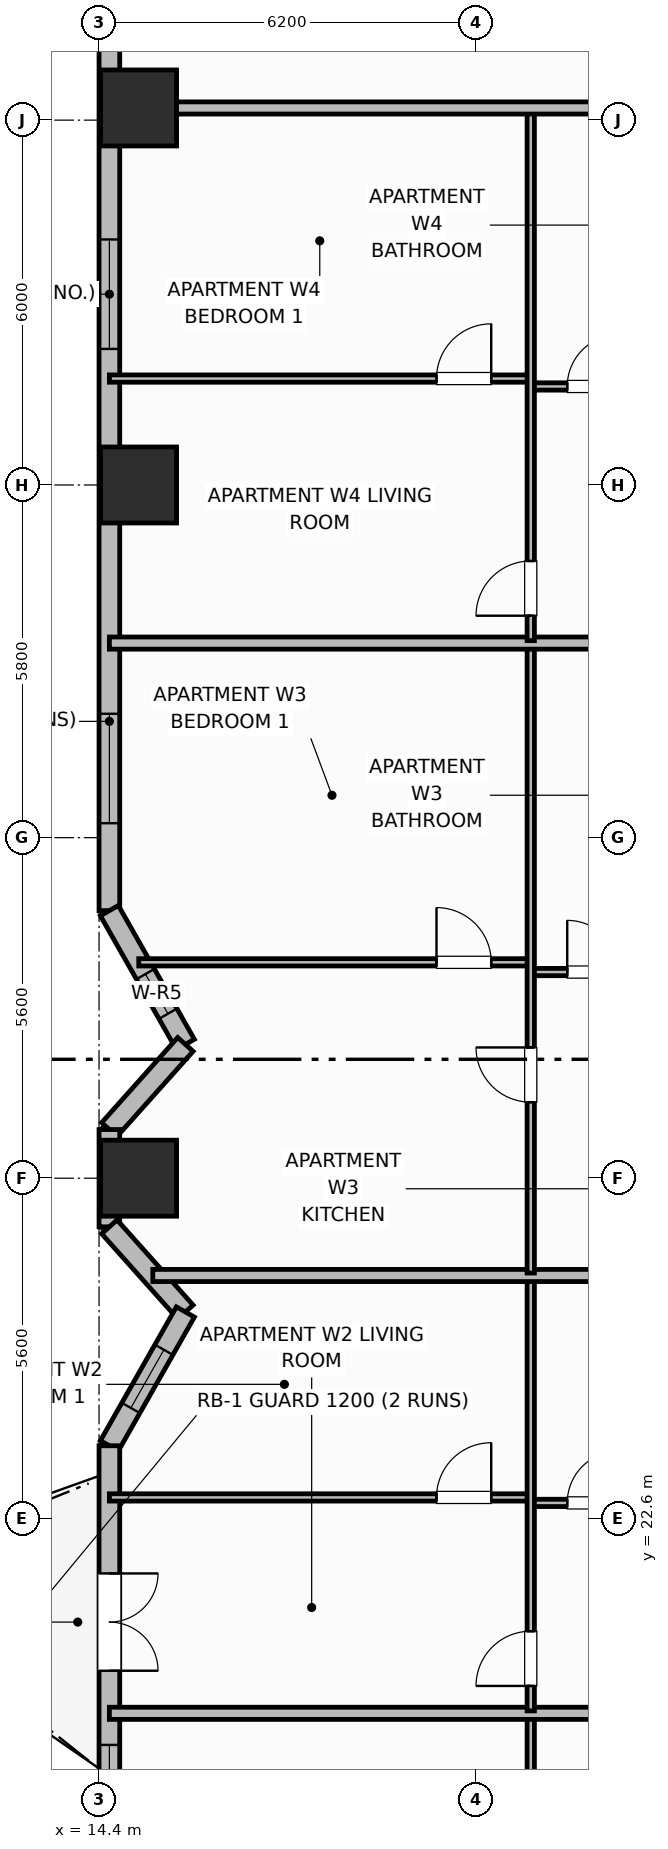
"""IFC4 building model, lengths in metres.
Left out: names, types, materials, properties, quantities, classifications, styles, units other than length and angle.
Written with IfcOpenShell. Run it as: python <this file> out.ifc"""

import sys

from ifc_helpers import new_model, si_unit, direction, frame, frame_2d, origin, origin_2d, place, context, subcontext, project, spatial, rectangle, extrude, element, fill, save


model = new_model("IFC4")
c1 = context("Model", 3, precision=1e-05, world=origin(), true_north=direction((0.0, 1.0)))
c2 = subcontext(c1, "Body", "Model", "MODEL_VIEW")
j1 = project(units=[si_unit("LENGTHUNIT", "METRE"), si_unit("PLANEANGLEUNIT", "RADIAN")], contexts=[c1])
p1 = place(None, origin())
s1 = spatial("IfcSite", under=j1, at=p1, CompositionType="ELEMENT")
p2 = place(p1, origin())
s2 = spatial("IfcBuilding", under=s1, at=p2, CompositionType="ELEMENT")
p3 = place(p2, frame((0.0, 0.0, 47.3)))
s3 = spatial("IfcBuildingStorey", under=s2, at=p3, CompositionType="ELEMENT", Elevation=47.3)
for number, where, z_axis, x_axis in (
    (1, (15.05, 28.2, 0.0), (0.0, 0.0, 1.0), (1.0, 0.0, 0.0)),
    (2, (15.05, 39.6, 0.0), (0.0, 0.0, 1.0), (1.0, 0.0, 0.0)),
    (3, (15.05, 45.8, 0.0), (0.0, 0.0, 1.0), (1.0, 0.0, 0.0)),
):
    element("IfcColumn", number, at=place(p3, frame(where, z_axis=z_axis, x_axis=x_axis)), inside=s3, PredefinedType="COLUMN", context=c2, shape_type="SweptSolid", body=[
        extrude(rectangle(XDim=1.25, YDim=1.25, at=origin_2d()), origin(), (0.0, 0.0, 1.0), 3.7),
    ])
p4 = place(p3, frame((14.57, 47.4, 0.0), z_axis=(0.0, 0.0, 1.0), x_axis=(0.0, -1.0, 0.0)))
e4 = element("IfcWall", 4, at=p4, inside=s3, PredefinedType="SOLIDWALL", context=c2, shape_type="SweptSolid", body=[
    extrude(rectangle(XDim=14.8, YDim=0.34, at=frame_2d((7.4, 0.0))), origin(), (0.0, 0.0, 1.0), 2.7),
])
p5 = place(p4, frame((3.762, 0.0, 0.73)))
e5 = element("IfcOpeningElement", 5, at=p5, cuts=e4, PredefinedType="OPENING", context=c2, shape_type="SweptSolid", body=[
    extrude(rectangle(XDim=1.8, YDim=1.85, at=frame_2d((0.9, 0.925))), frame((0.0, 0.18, 0.0), z_axis=(0.0, -1.0, 0.0), x_axis=(1.0, 0.0, 0.0)), (0.0, 0.0, 1.0), 0.36),
])
p6 = place(p4, frame((11.562, 0.0, 0.73)))
e6 = element("IfcOpeningElement", 6, at=p6, cuts=e4, PredefinedType="OPENING", context=c2, shape_type="SweptSolid", body=[
    extrude(rectangle(XDim=1.8, YDim=1.85, at=frame_2d((0.9, 0.925))), frame((0.0, 0.18, 0.0), z_axis=(0.0, -1.0, 0.0), x_axis=(1.0, 0.0, 0.0)), (0.0, 0.0, 1.0), 0.36),
])
p7 = place(p3, frame((14.57, 32.6, 0.0), z_axis=(0.0, 0.0, 1.0), x_axis=(0.493976255291, -0.869475393101, 0.0)))
e7 = element("IfcWall", 7, at=p7, inside=s3, PredefinedType="SOLIDWALL", context=c2, shape_type="SweptSolid", body=[
    extrude(rectangle(XDim=2.531, YDim=0.34, at=frame_2d((1.265, 0.0))), origin(), (0.0, 0.0, 1.0), 2.7),
])
p8 = place(p7, frame((1.2, 0.0, 0.89)))
e8 = element("IfcOpeningElement", 8, at=p8, cuts=e7, PredefinedType="OPENING", context=c2, shape_type="SweptSolid", body=[
    extrude(rectangle(XDim=0.75, YDim=1.65, at=frame_2d((0.375, 0.825))), frame((0.0, 0.18, 0.0), z_axis=(0.0, -1.0, 0.0), x_axis=(1.0, 0.0, 0.0)), (0.0, 0.0, 1.0), 0.36),
])
p9 = place(p3, frame((15.82, 30.4, 0.0), z_axis=(0.0, 0.0, 1.0), x_axis=(-0.666041619974, -0.74591457987, 0.0)))
e9 = element("IfcWall", 9, at=p9, inside=s3, PredefinedType="SOLIDWALL", context=c2, shape_type="SweptSolid", body=[
    extrude(rectangle(XDim=1.877, YDim=0.34, at=frame_2d((0.938, 0.0))), origin(), (0.0, 0.0, 1.0), 2.7),
])
p10 = place(p3, frame((14.57, 29.0, 0.0), z_axis=(0.0, 0.0, 1.0), x_axis=(0.0, -1.0, 0.0)))
e10 = element("IfcWall", 10, at=p10, inside=s3, PredefinedType="SOLIDWALL", context=c2, shape_type="SweptSolid", body=[
    extrude(rectangle(XDim=1.6, YDim=0.34, at=frame_2d((0.8, 0.0))), origin(), (0.0, 0.0, 1.0), 2.7),
])
p11 = place(p3, frame((14.57, 27.4, 0.0), z_axis=(0.0, 0.0, 1.0), x_axis=(0.666041619974, -0.74591457987, 0.0)))
e11 = element("IfcWall", 11, at=p11, inside=s3, PredefinedType="SOLIDWALL", context=c2, shape_type="SweptSolid", body=[
    extrude(rectangle(XDim=1.877, YDim=0.34, at=frame_2d((0.938, 0.0))), origin(), (0.0, 0.0, 1.0), 2.7),
])
p12 = place(p3, frame((15.82, 26.0, 0.0), z_axis=(0.0, 0.0, 1.0), x_axis=(-0.494017696272, -0.869451847873, 0.0)))
e12 = element("IfcWall", 12, at=p12, inside=s3, PredefinedType="SOLIDWALL", context=c2, shape_type="SweptSolid", body=[
    extrude(rectangle(XDim=2.53, YDim=0.34, at=frame_2d((1.265, 0.0))), origin(), (0.0, 0.0, 1.0), 2.7),
])
p13 = place(p12, frame((0.715, 0.0, 0.89)))
e13 = element("IfcOpeningElement", 13, at=p13, cuts=e12, PredefinedType="OPENING", context=c2, shape_type="SweptSolid", body=[
    extrude(rectangle(XDim=1.1, YDim=1.65, at=frame_2d((0.55, 0.825))), frame((0.0, 0.18, 0.0), z_axis=(0.0, -1.0, 0.0), x_axis=(1.0, 0.0, 0.0)), (0.0, 0.0, 1.0), 0.36),
])
p14 = place(p3, frame((14.57, 23.8, 0.0), z_axis=(0.0, 0.0, 1.0), x_axis=(0.0, -1.0, 0.0)))
e14 = element("IfcWall", 14, at=p14, inside=s3, PredefinedType="SOLIDWALL", context=c2, shape_type="SweptSolid", body=[
    extrude(rectangle(XDim=14.8, YDim=0.34, at=frame_2d((7.4, 0.0))), origin(), (0.0, 0.0, 1.0), 2.7),
])
p15 = place(p14, frame((2.1, 0.0, 0.0)))
e15 = element("IfcOpeningElement", 15, at=p15, cuts=e14, PredefinedType="OPENING", context=c2, shape_type="SweptSolid", body=[
    extrude(rectangle(XDim=1.6, YDim=2.1, at=frame_2d((0.8, 1.05))), frame((0.0, 0.18, 0.0), z_axis=(0.0, -1.0, 0.0), x_axis=(1.0, 0.0, 0.0)), (0.0, 0.0, 1.0), 0.36),
])
p16 = place(p14, frame((4.92, 0.0, 0.69)))
e16 = element("IfcOpeningElement", 16, at=p16, cuts=e14, PredefinedType="OPENING", context=c2, shape_type="SweptSolid", body=[
    extrude(rectangle(XDim=1.4, YDim=1.85, at=frame_2d((0.7, 0.925))), frame((0.0, 0.18, 0.0), z_axis=(0.0, -1.0, 0.0), x_axis=(1.0, 0.0, 0.0)), (0.0, 0.0, 1.0), 0.36),
])
p17 = place(p14, frame((9.337, 0.0, 0.68)))
e17 = element("IfcOpeningElement", 17, at=p17, cuts=e14, PredefinedType="OPENING", context=c2, shape_type="SweptSolid", body=[
    extrude(rectangle(XDim=1.6, YDim=1.9, at=frame_2d((0.8, 0.95))), frame((0.0, 0.18, 0.0), z_axis=(0.0, -1.0, 0.0), x_axis=(1.0, 0.0, 0.0)), (0.0, 0.0, 1.0), 0.36),
])
p18 = place(p3, frame((21.5, 10.64, 0.0), z_axis=(0.0, 0.0, 1.0), x_axis=(0.0, 1.0, 0.0)))
e18 = element("IfcWall", 18, at=p18, inside=s3, PredefinedType="PARTITIONING", context=c2, shape_type="SweptSolid", body=[
    extrude(rectangle(XDim=8.72, YDim=0.12, at=frame_2d((4.36, 0.0))), origin(), (0.0, 0.0, 1.0), 2.53),
])
p19 = place(p18, frame((0.41, 0.0, 0.0)))
e19 = element("IfcOpeningElement", 19, at=p19, cuts=e18, PredefinedType="OPENING", context=c2, shape_type="SweptSolid", body=[
    extrude(rectangle(XDim=0.9, YDim=2.1, at=frame_2d((0.45, 1.05))), frame((0.0, 0.07, 0.0), z_axis=(0.0, -1.0, 0.0), x_axis=(1.0, 0.0, 0.0)), (0.0, 0.0, 1.0), 0.14),
])
p20 = place(p3, frame((14.57, 19.4, 0.0), z_axis=(0.0, 0.0, 1.0), x_axis=(1.0, 0.0, 0.0)))
e20 = element("IfcWall", 20, at=p20, inside=s3, PredefinedType="PARTITIONING", context=c2, shape_type="SweptSolid", body=[
    extrude(rectangle(XDim=9.18, YDim=0.2, at=frame_2d((4.59, 0.0))), origin(), (0.0, 0.0, 1.0), 2.53),
])
p21 = place(p3, frame((21.5, 22.86, 0.0), z_axis=(0.0, 0.0, 1.0), x_axis=(1.0, 0.0, 0.0)))
e21 = element("IfcWall", 21, at=p21, inside=s3, PredefinedType="PARTITIONING", context=c2, shape_type="SweptSolid", body=[
    extrude(rectangle(XDim=2.25, YDim=0.12, at=frame_2d((1.125, 0.0))), origin(), (0.0, 0.0, 1.0), 2.53),
])
p22 = place(p21, frame((0.6, 0.0, 0.0)))
e22 = element("IfcOpeningElement", 22, at=p22, cuts=e21, PredefinedType="OPENING", context=c2, shape_type="SweptSolid", body=[
    extrude(rectangle(XDim=0.85, YDim=2.1, at=frame_2d((0.425, 1.05))), frame((0.0, 0.07, 0.0), z_axis=(0.0, -1.0, 0.0), x_axis=(1.0, 0.0, 0.0)), (0.0, 0.0, 1.0), 0.14),
])
p23 = place(p3, frame((14.57, 22.95, 0.0), z_axis=(0.0, 0.0, 1.0), x_axis=(1.0, 0.0, 0.0)))
e23 = element("IfcWall", 23, at=p23, inside=s3, PredefinedType="PARTITIONING", context=c2, shape_type="SweptSolid", body=[
    extrude(rectangle(XDim=6.93, YDim=0.12, at=frame_2d((3.465, 0.0))), origin(), (0.0, 0.0, 1.0), 2.53),
])
p24 = place(p23, frame((5.38, 0.0, 0.0)))
e24 = element("IfcOpeningElement", 24, at=p24, cuts=e23, PredefinedType="OPENING", context=c2, shape_type="SweptSolid", body=[
    extrude(rectangle(XDim=0.9, YDim=2.1, at=frame_2d((0.45, 1.05))), frame((0.0, 0.07, 0.0), z_axis=(0.0, -1.0, 0.0), x_axis=(1.0, 0.0, 0.0)), (0.0, 0.0, 1.0), 0.14),
])
p25 = place(p3, frame((21.5, 19.44, 0.0), z_axis=(0.0, 0.0, 1.0), x_axis=(0.0, 1.0, 0.0)))
e25 = element("IfcWall", 25, at=p25, inside=s3, PredefinedType="PARTITIONING", context=c2, shape_type="SweptSolid", body=[
    extrude(rectangle(XDim=7.12, YDim=0.12, at=frame_2d((3.56, 0.0))), origin(), (0.0, 0.0, 1.0), 2.53),
])
p26 = place(p25, frame((0.41, 0.0, 0.0)))
e26 = element("IfcOpeningElement", 26, at=p26, cuts=e25, PredefinedType="OPENING", context=c2, shape_type="SweptSolid", body=[
    extrude(rectangle(XDim=0.9, YDim=2.1, at=frame_2d((0.45, 1.05))), frame((0.0, 0.07, 0.0), z_axis=(0.0, -1.0, 0.0), x_axis=(1.0, 0.0, 0.0)), (0.0, 0.0, 1.0), 0.14),
])
p27 = place(p3, frame((15.284, 26.6, 0.0), z_axis=(0.0, 0.0, 1.0), x_axis=(1.0, 0.0, 0.0)))
e27 = element("IfcWall", 27, at=p27, inside=s3, PredefinedType="PARTITIONING", context=c2, shape_type="SweptSolid", body=[
    extrude(rectangle(XDim=8.466, YDim=0.2, at=frame_2d((4.233, 0.0))), origin(), (0.0, 0.0, 1.0), 2.53),
])
p28 = place(p3, frame((21.5, 31.59, 0.0), z_axis=(0.0, 0.0, 1.0), x_axis=(1.0, 0.0, 0.0)))
e28 = element("IfcWall", 28, at=p28, inside=s3, PredefinedType="PARTITIONING", context=c2, shape_type="SweptSolid", body=[
    extrude(rectangle(XDim=2.25, YDim=0.12, at=frame_2d((1.125, 0.0))), origin(), (0.0, 0.0, 1.0), 2.53),
])
p29 = place(p28, frame((0.6, 0.0, 0.0)))
e29 = element("IfcOpeningElement", 29, at=p29, cuts=e28, PredefinedType="OPENING", context=c2, shape_type="SweptSolid", body=[
    extrude(rectangle(XDim=0.85, YDim=2.1, at=frame_2d((0.425, 1.05))), frame((0.0, 0.07, 0.0), z_axis=(0.0, -1.0, 0.0), x_axis=(1.0, 0.0, 0.0)), (0.0, 0.0, 1.0), 0.14),
])
p30 = place(p3, frame((15.053, 31.75, 0.0), z_axis=(0.0, 0.0, 1.0), x_axis=(1.0, 0.0, 0.0)))
e30 = element("IfcWall", 30, at=p30, inside=s3, PredefinedType="PARTITIONING", context=c2, shape_type="SweptSolid", body=[
    extrude(rectangle(XDim=6.447, YDim=0.12, at=frame_2d((3.224, 0.0))), origin(), (0.0, 0.0, 1.0), 2.53),
])
p31 = place(p30, frame((4.897, 0.0, 0.0)))
e31 = element("IfcOpeningElement", 31, at=p31, cuts=e30, PredefinedType="OPENING", context=c2, shape_type="SweptSolid", body=[
    extrude(rectangle(XDim=0.9, YDim=2.1, at=frame_2d((0.45, 1.05))), frame((0.0, 0.07, 0.0), z_axis=(0.0, -1.0, 0.0), x_axis=(1.0, 0.0, 0.0)), (0.0, 0.0, 1.0), 0.14),
])
p32 = place(p3, frame((21.5, 26.64, 0.0), z_axis=(0.0, 0.0, 1.0), x_axis=(0.0, 1.0, 0.0)))
e32 = element("IfcWall", 32, at=p32, inside=s3, PredefinedType="PARTITIONING", context=c2, shape_type="SweptSolid", body=[
    extrude(rectangle(XDim=10.32, YDim=0.12, at=frame_2d((5.16, 0.0))), origin(), (0.0, 0.0, 1.0), 2.53),
])
p33 = place(p32, frame((2.81, 0.0, 0.0)))
e33 = element("IfcOpeningElement", 33, at=p33, cuts=e32, PredefinedType="OPENING", context=c2, shape_type="SweptSolid", body=[
    extrude(rectangle(XDim=0.9, YDim=2.1, at=frame_2d((0.45, 1.05))), frame((0.0, 0.07, 0.0), z_axis=(0.0, -1.0, 0.0), x_axis=(1.0, 0.0, 0.0)), (0.0, 0.0, 1.0), 0.14),
])
p34 = place(p3, frame((14.57, 37.0, 0.0), z_axis=(0.0, 0.0, 1.0), x_axis=(1.0, 0.0, 0.0)))
e34 = element("IfcWall", 34, at=p34, inside=s3, PredefinedType="PARTITIONING", context=c2, shape_type="SweptSolid", body=[
    extrude(rectangle(XDim=9.18, YDim=0.2, at=frame_2d((4.59, 0.0))), origin(), (0.0, 0.0, 1.0), 2.53),
])
p35 = place(p3, frame((21.5, 41.22, 0.0), z_axis=(0.0, 0.0, 1.0), x_axis=(1.0, 0.0, 0.0)))
e35 = element("IfcWall", 35, at=p35, inside=s3, PredefinedType="PARTITIONING", context=c2, shape_type="SweptSolid", body=[
    extrude(rectangle(XDim=2.25, YDim=0.12, at=frame_2d((1.125, 0.0))), origin(), (0.0, 0.0, 1.0), 2.53),
])
p36 = place(p35, frame((0.6, 0.0, 0.0)))
e36 = element("IfcOpeningElement", 36, at=p36, cuts=e35, PredefinedType="OPENING", context=c2, shape_type="SweptSolid", body=[
    extrude(rectangle(XDim=0.85, YDim=2.1, at=frame_2d((0.425, 1.05))), frame((0.0, 0.07, 0.0), z_axis=(0.0, -1.0, 0.0), x_axis=(1.0, 0.0, 0.0)), (0.0, 0.0, 1.0), 0.14),
])
p37 = place(p3, frame((14.57, 41.35, 0.0), z_axis=(0.0, 0.0, 1.0), x_axis=(1.0, 0.0, 0.0)))
e37 = element("IfcWall", 37, at=p37, inside=s3, PredefinedType="PARTITIONING", context=c2, shape_type="SweptSolid", body=[
    extrude(rectangle(XDim=6.93, YDim=0.12, at=frame_2d((3.465, 0.0))), origin(), (0.0, 0.0, 1.0), 2.53),
])
p38 = place(p37, frame((5.38, 0.0, 0.0)))
e38 = element("IfcOpeningElement", 38, at=p38, cuts=e37, PredefinedType="OPENING", context=c2, shape_type="SweptSolid", body=[
    extrude(rectangle(XDim=0.9, YDim=2.1, at=frame_2d((0.45, 1.05))), frame((0.0, 0.07, 0.0), z_axis=(0.0, -1.0, 0.0), x_axis=(1.0, 0.0, 0.0)), (0.0, 0.0, 1.0), 0.14),
])
p39 = place(p3, frame((21.5, 37.04, 0.0), z_axis=(0.0, 0.0, 1.0), x_axis=(0.0, 1.0, 0.0)))
e39 = element("IfcWall", 39, at=p39, inside=s3, PredefinedType="PARTITIONING", context=c2, shape_type="SweptSolid", body=[
    extrude(rectangle(XDim=8.72, YDim=0.12, at=frame_2d((4.36, 0.0))), origin(), (0.0, 0.0, 1.0), 2.53),
])
p40 = place(p39, frame((0.41, 0.0, 0.0)))
e40 = element("IfcOpeningElement", 40, at=p40, cuts=e39, PredefinedType="OPENING", context=c2, shape_type="SweptSolid", body=[
    extrude(rectangle(XDim=0.9, YDim=2.1, at=frame_2d((0.45, 1.05))), frame((0.0, 0.07, 0.0), z_axis=(0.0, -1.0, 0.0), x_axis=(1.0, 0.0, 0.0)), (0.0, 0.0, 1.0), 0.14),
])
p41 = place(p3, frame((14.99, 45.8, 0.0), z_axis=(0.0, 0.0, 1.0), x_axis=(1.0, 0.0, 0.0)))
e41 = element("IfcWall", 41, at=p41, inside=s3, PredefinedType="PARTITIONING", context=c2, shape_type="SweptSolid", body=[
    extrude(rectangle(XDim=8.76, YDim=0.2, at=frame_2d((4.38, 0.0))), origin(), (0.0, 0.0, 1.0), 2.53),
])
p42 = place(p5, origin())
e42 = element("IfcWindow", 42, at=p42, inside=s3, PartitioningType="SINGLE_PANEL", PredefinedType="WINDOW", context=c2, shape_type="SweptSolid", body=[
    extrude(rectangle(XDim=1.8, YDim=1.85, at=frame_2d((0.9, 0.925))), frame((0.0, 0.03, 0.0), z_axis=(0.0, -1.0, 0.0), x_axis=(1.0, 0.0, 0.0)), (0.0, 0.0, 1.0), 0.06),
])
fill(e5, e42)
p43 = place(p6, origin())
e43 = element("IfcWindow", 43, at=p43, inside=s3, PartitioningType="SINGLE_PANEL", PredefinedType="WINDOW", context=c2, shape_type="SweptSolid", body=[
    extrude(rectangle(XDim=1.8, YDim=1.85, at=frame_2d((0.9, 0.925))), frame((0.0, 0.03, 0.0), z_axis=(0.0, -1.0, 0.0), x_axis=(1.0, 0.0, 0.0)), (0.0, 0.0, 1.0), 0.06),
])
fill(e6, e43)
p44 = place(p8, origin())
e44 = element("IfcWindow", 44, at=p44, inside=s3, PartitioningType="SINGLE_PANEL", PredefinedType="WINDOW", context=c2, shape_type="SweptSolid", body=[
    extrude(rectangle(XDim=0.75, YDim=1.65, at=frame_2d((0.375, 0.825))), frame((0.0, 0.03, 0.0), z_axis=(0.0, -1.0, 0.0), x_axis=(1.0, 0.0, 0.0)), (0.0, 0.0, 1.0), 0.06),
])
fill(e8, e44)
p45 = place(p13, origin())
e45 = element("IfcWindow", 45, at=p45, inside=s3, PartitioningType="SINGLE_PANEL", PredefinedType="WINDOW", context=c2, shape_type="SweptSolid", body=[
    extrude(rectangle(XDim=1.1, YDim=1.65, at=frame_2d((0.55, 0.825))), frame((0.0, 0.03, 0.0), z_axis=(0.0, -1.0, 0.0), x_axis=(1.0, 0.0, 0.0)), (0.0, 0.0, 1.0), 0.06),
])
fill(e13, e45)
p46 = place(p15, origin())
e46 = element("IfcDoor", 46, at=p46, inside=s3, OperationType="DOUBLE_DOOR_SINGLE_SWING", PredefinedType="DOOR", context=c2, shape_type="SweptSolid", body=[
    extrude(rectangle(XDim=1.6, YDim=2.1, at=frame_2d((0.8, 1.05))), frame((0.0, 0.025, 0.0), z_axis=(0.0, -1.0, 0.0), x_axis=(1.0, 0.0, 0.0)), (0.0, 0.0, 1.0), 0.05),
])
fill(e15, e46)
p47 = place(p16, origin())
e47 = element("IfcWindow", 47, at=p47, inside=s3, PartitioningType="SINGLE_PANEL", PredefinedType="WINDOW", context=c2, shape_type="SweptSolid", body=[
    extrude(rectangle(XDim=1.4, YDim=1.85, at=frame_2d((0.7, 0.925))), frame((0.0, 0.03, 0.0), z_axis=(0.0, -1.0, 0.0), x_axis=(1.0, 0.0, 0.0)), (0.0, 0.0, 1.0), 0.06),
])
fill(e16, e47)
p48 = place(p22, origin())
e48 = element("IfcDoor", 48, at=p48, inside=s3, OperationType="SINGLE_SWING_RIGHT", PredefinedType="DOOR", context=c2, shape_type="SweptSolid", body=[
    extrude(rectangle(XDim=0.85, YDim=2.1, at=frame_2d((0.425, 1.05))), frame((0.0, 0.025, 0.0), z_axis=(0.0, -1.0, 0.0), x_axis=(1.0, 0.0, 0.0)), (0.0, 0.0, 1.0), 0.05),
])
fill(e22, e48)
p49 = place(p24, origin())
e49 = element("IfcDoor", 49, at=p49, inside=s3, OperationType="SINGLE_SWING_RIGHT", PredefinedType="DOOR", context=c2, shape_type="SweptSolid", body=[
    extrude(rectangle(XDim=0.9, YDim=2.1, at=frame_2d((0.45, 1.05))), frame((0.0, 0.025, 0.0), z_axis=(0.0, -1.0, 0.0), x_axis=(1.0, 0.0, 0.0)), (0.0, 0.0, 1.0), 0.05),
])
fill(e24, e49)
p50 = place(p26, origin())
e50 = element("IfcDoor", 50, at=p50, inside=s3, OperationType="SINGLE_SWING_LEFT", PredefinedType="DOOR", context=c2, shape_type="SweptSolid", body=[
    extrude(rectangle(XDim=0.9, YDim=2.1, at=frame_2d((0.45, 1.05))), frame((0.0, 0.025, 0.0), z_axis=(0.0, -1.0, 0.0), x_axis=(1.0, 0.0, 0.0)), (0.0, 0.0, 1.0), 0.05),
])
fill(e26, e50)
p51 = place(p29, origin())
e51 = element("IfcDoor", 51, at=p51, inside=s3, OperationType="SINGLE_SWING_LEFT", PredefinedType="DOOR", context=c2, shape_type="SweptSolid", body=[
    extrude(rectangle(XDim=0.85, YDim=2.1, at=frame_2d((0.425, 1.05))), frame((0.0, 0.025, 0.0), z_axis=(0.0, -1.0, 0.0), x_axis=(1.0, 0.0, 0.0)), (0.0, 0.0, 1.0), 0.05),
])
fill(e29, e51)
p52 = place(p31, origin())
e52 = element("IfcDoor", 52, at=p52, inside=s3, OperationType="SINGLE_SWING_LEFT", PredefinedType="DOOR", context=c2, shape_type="SweptSolid", body=[
    extrude(rectangle(XDim=0.9, YDim=2.1, at=frame_2d((0.45, 1.05))), frame((0.0, 0.025, 0.0), z_axis=(0.0, -1.0, 0.0), x_axis=(1.0, 0.0, 0.0)), (0.0, 0.0, 1.0), 0.05),
])
fill(e31, e52)
p53 = place(p33, origin())
e53 = element("IfcDoor", 53, at=p53, inside=s3, OperationType="SINGLE_SWING_RIGHT", PredefinedType="DOOR", context=c2, shape_type="SweptSolid", body=[
    extrude(rectangle(XDim=0.9, YDim=2.1, at=frame_2d((0.45, 1.05))), frame((0.0, 0.025, 0.0), z_axis=(0.0, -1.0, 0.0), x_axis=(1.0, 0.0, 0.0)), (0.0, 0.0, 1.0), 0.05),
])
fill(e33, e53)
p54 = place(p36, origin())
e54 = element("IfcDoor", 54, at=p54, inside=s3, OperationType="SINGLE_SWING_RIGHT", PredefinedType="DOOR", context=c2, shape_type="SweptSolid", body=[
    extrude(rectangle(XDim=0.85, YDim=2.1, at=frame_2d((0.425, 1.05))), frame((0.0, 0.025, 0.0), z_axis=(0.0, -1.0, 0.0), x_axis=(1.0, 0.0, 0.0)), (0.0, 0.0, 1.0), 0.05),
])
fill(e36, e54)
p55 = place(p38, origin())
e55 = element("IfcDoor", 55, at=p55, inside=s3, OperationType="SINGLE_SWING_RIGHT", PredefinedType="DOOR", context=c2, shape_type="SweptSolid", body=[
    extrude(rectangle(XDim=0.9, YDim=2.1, at=frame_2d((0.45, 1.05))), frame((0.0, 0.025, 0.0), z_axis=(0.0, -1.0, 0.0), x_axis=(1.0, 0.0, 0.0)), (0.0, 0.0, 1.0), 0.05),
])
fill(e38, e55)
p56 = place(p40, origin())
e56 = element("IfcDoor", 56, at=p56, inside=s3, OperationType="SINGLE_SWING_LEFT", PredefinedType="DOOR", context=c2, shape_type="SweptSolid", body=[
    extrude(rectangle(XDim=0.9, YDim=2.1, at=frame_2d((0.45, 1.05))), frame((0.0, 0.025, 0.0), z_axis=(0.0, -1.0, 0.0), x_axis=(1.0, 0.0, 0.0)), (0.0, 0.0, 1.0), 0.05),
])
fill(e40, e56)
save(model, sys.argv[1])
